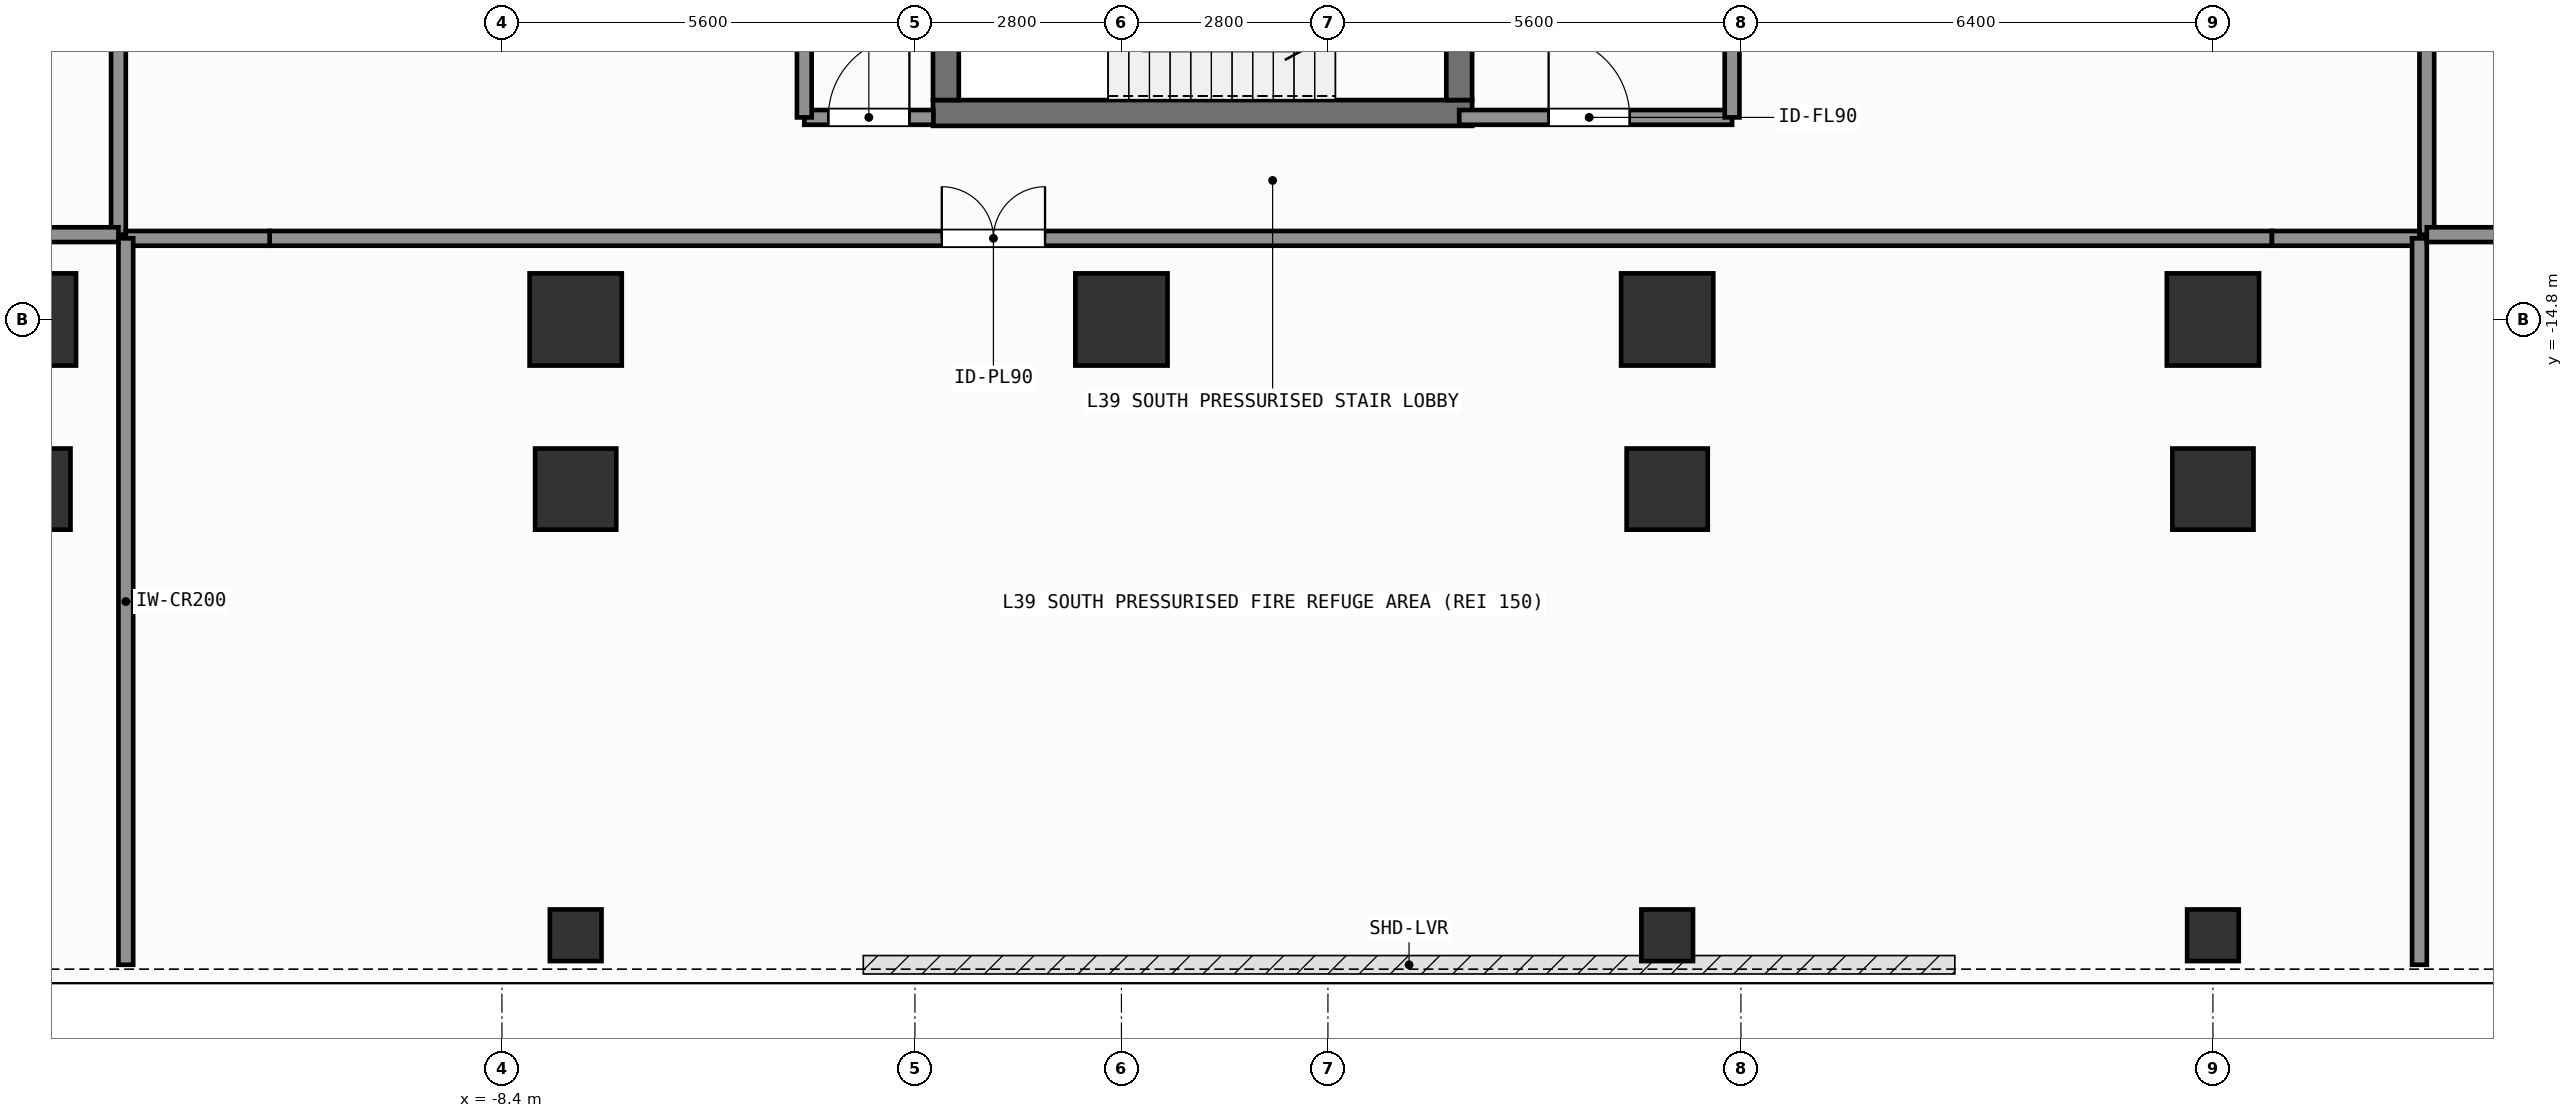
"""IFC4 building model, lengths in metres.
Left out: names, types, materials, properties, quantities, classifications, styles, units other than length and angle.
Written with IfcOpenShell. Run it as: python <this file> out.ifc"""

import sys

from ifc_helpers import new_model, si_unit, direction, frame, frame_2d, origin, origin_2d, place, context, subcontext, project, spatial, rectangle, hollow_rectangle, extrude, element, fill, save


model = new_model("IFC4")
c1 = context("Model", 3, precision=1e-05, world=origin(), true_north=direction((0.0, 1.0)))
c2 = subcontext(c1, "Body", "Model", "MODEL_VIEW")
j1 = project(units=[si_unit("LENGTHUNIT", "METRE"), si_unit("PLANEANGLEUNIT", "RADIAN")], contexts=[c1])
p1 = place(None, origin())
s1 = spatial("IfcSite", under=j1, at=p1, CompositionType="ELEMENT")
p2 = place(p1, origin())
s2 = spatial("IfcBuilding", under=s1, at=p2, CompositionType="ELEMENT")
p3 = place(p2, frame((0.0, 0.0, 156.3)))
s3 = spatial("IfcBuildingStorey", under=s2, at=p3, CompositionType="ELEMENT", Elevation=156.3)
p4 = place(p3, frame((-2.555, -12.0, 0.0), z_axis=(0.0, 0.0, 1.0), x_axis=(1.0, 0.0, 0.0)))
e1 = element("IfcWall", 1, at=p4, inside=s3, PredefinedType="SHEAR", context=c2, shape_type="SweptSolid", body=[
    extrude(rectangle(XDim=7.31, YDim=0.35, at=frame_2d((3.655, 0.0))), origin(), (0.0, 0.0, 1.0), 7.8),
])
p5 = place(p3, frame((-2.38, -11.825, 0.0), z_axis=(0.0, 0.0, 1.0), x_axis=(0.0, 1.0, 0.0)))
e2 = element("IfcWall", 2, at=p5, inside=s3, PredefinedType="SHEAR", context=c2, shape_type="SweptSolid", body=[
    extrude(rectangle(XDim=2.925, YDim=0.35, at=frame_2d((1.462, 0.0))), origin(), (0.0, 0.0, 1.0), 7.8),
])
p6 = place(p3, frame((4.58, -8.9, 0.0), z_axis=(0.0, 0.0, 1.0), x_axis=(0.0, -1.0, 0.0)))
e3 = element("IfcWall", 3, at=p6, inside=s3, PredefinedType="SHEAR", context=c2, shape_type="SweptSolid", body=[
    extrude(rectangle(XDim=2.925, YDim=0.35, at=frame_2d((1.462, 0.0))), origin(), (0.0, 0.0, 1.0), 7.8),
])
p7 = place(p6, frame((0.913, 0.0, 0.0)))
e4 = element("IfcOpeningElement", 4, at=p7, cuts=e3, PredefinedType="OPENING", context=c2, shape_type="SweptSolid", body=[
    extrude(rectangle(XDim=1.1, YDim=2.15, at=frame_2d((0.55, 1.075))), frame((0.0, 0.185, 0.0), z_axis=(0.0, -1.0, 0.0), x_axis=(1.0, 0.0, 0.0)), (0.0, 0.0, 1.0), 0.37),
])
for number, where, z_axis, x_axis in (
    (5, (-14.8, -14.8, 0.0), (0.0, 0.0, 1.0), (1.0, 0.0, 0.0)),
    (6, (-7.4, -14.8, 0.0), (0.0, 0.0, 1.0), (1.0, 0.0, 0.0)),
    (7, (0.0, -14.8, 0.0), (0.0, 0.0, 1.0), (1.0, 0.0, 0.0)),
    (8, (7.4, -14.8, 0.0), (0.0, 0.0, 1.0), (1.0, 0.0, 0.0)),
    (9, (14.8, -14.8, 0.0), (0.0, 0.0, 1.0), (1.0, 0.0, 0.0)),
):
    element("IfcColumn", number, at=place(p3, frame(where, z_axis=z_axis, x_axis=x_axis)), inside=s3, PredefinedType="COLUMN", context=c2, shape_type="SweptSolid", body=[
        extrude(rectangle(XDim=1.25, YDim=1.25, at=origin_2d()), origin(), (0.0, 0.0, 1.0), 7.8),
    ])
for number, where, z_axis, x_axis in (
    (10, (-14.8, -17.1, 0.0), (0.0, 0.0, 1.0), (1.0, 0.0, 0.0)),
    (11, (-7.4, -17.1, 0.0), (0.0, 0.0, 1.0), (1.0, 0.0, 0.0)),
    (12, (7.4, -17.1, 0.0), (0.0, 0.0, 1.0), (1.0, 0.0, 0.0)),
    (13, (14.8, -17.1, 0.0), (0.0, 0.0, 1.0), (1.0, 0.0, 0.0)),
):
    element("IfcColumn", number, at=place(p3, frame(where, z_axis=z_axis, x_axis=x_axis)), inside=s3, PredefinedType="COLUMN", context=c2, shape_type="SweptSolid", body=[
        extrude(rectangle(XDim=1.1, YDim=1.1, at=origin_2d()), origin(), (0.0, 0.0, 1.0), 7.8),
    ])
for number, where, z_axis, x_axis in (
    (14, (-7.4, -23.15, 0.0), (0.0, 0.0, 1.0), (1.0, 0.0, 0.0)),
    (15, (7.4, -23.15, 0.0), (0.0, 0.0, 1.0), (1.0, 0.0, 0.0)),
    (16, (14.8, -23.15, 0.0), (0.0, 0.0, 1.0), (1.0, 0.0, 0.0)),
):
    element("IfcColumn", number, at=place(p3, frame(where, z_axis=z_axis, x_axis=x_axis)), inside=s3, PredefinedType="COLUMN", context=c2, shape_type="SweptSolid", body=[
        extrude(hollow_rectangle(XDim=0.7, YDim=0.7, WallThickness=0.032, at=origin_2d()), origin(), (0.0, 0.0, 1.0), 7.8),
    ])
p8 = place(p3, frame((4.58, -12.06, 0.0), z_axis=(0.0, 0.0, 1.0), x_axis=(1.0, 0.0, 0.0)))
e17 = element("IfcWall", 17, at=p8, inside=s3, PredefinedType="SOLIDWALL", context=c2, shape_type="SweptSolid", body=[
    extrude(rectangle(XDim=3.7, YDim=0.2, at=frame_2d((1.85, 0.0))), origin(), (0.0, 0.0, 1.0), 7.58),
])
p9 = place(p8, frame((1.212, 0.0, 0.0)))
e18 = element("IfcOpeningElement", 18, at=p9, cuts=e17, PredefinedType="OPENING", context=c2, shape_type="SweptSolid", body=[
    extrude(rectangle(XDim=1.1, YDim=2.15, at=frame_2d((0.55, 1.075))), frame((0.0, 0.11, 0.0), z_axis=(0.0, -1.0, 0.0), x_axis=(1.0, 0.0, 0.0)), (0.0, 0.0, 1.0), 0.22),
])
p10 = place(p3, frame((-4.3, -12.06, 0.0), z_axis=(0.0, 0.0, 1.0), x_axis=(1.0, 0.0, 0.0)))
e19 = element("IfcWall", 19, at=p10, inside=s3, PredefinedType="SOLIDWALL", context=c2, shape_type="SweptSolid", body=[
    extrude(rectangle(XDim=1.75, YDim=0.2, at=frame_2d((0.875, 0.0))), origin(), (0.0, 0.0, 1.0), 7.58),
])
p11 = place(p10, frame((0.325, 0.0, 0.0)))
e20 = element("IfcOpeningElement", 20, at=p11, cuts=e19, PredefinedType="OPENING", context=c2, shape_type="SweptSolid", body=[
    extrude(rectangle(XDim=1.1, YDim=2.15, at=frame_2d((0.55, 1.075))), frame((0.0, 0.11, 0.0), z_axis=(0.0, -1.0, 0.0), x_axis=(1.0, 0.0, 0.0)), (0.0, 0.0, 1.0), 0.22),
])
p12 = place(p3, frame((-11.55, -13.7, 0.0), z_axis=(0.0, 0.0, 1.0), x_axis=(1.0, 0.0, 0.0)))
e21 = element("IfcWall", 21, at=p12, inside=s3, PredefinedType="SOLIDWALL", context=c2, shape_type="SweptSolid", body=[
    extrude(rectangle(XDim=27.15, YDim=0.2, at=frame_2d((13.575, 0.0))), origin(), (0.0, 0.0, 1.0), 7.58),
])
p13 = place(p12, frame((9.114, 0.0, 0.0)))
e22 = element("IfcOpeningElement", 22, at=p13, cuts=e21, PredefinedType="OPENING", context=c2, shape_type="SweptSolid", body=[
    extrude(rectangle(XDim=1.4, YDim=2.2, at=frame_2d((0.7, 1.1))), frame((0.0, 0.11, 0.0), z_axis=(0.0, -1.0, 0.0), x_axis=(1.0, 0.0, 0.0)), (0.0, 0.0, 1.0), 0.22),
])
p14 = place(p3, frame((-13.6, -13.65, 0.0), z_axis=(0.0, 0.0, 1.0), x_axis=(0.0, 1.0, 0.0)))
e23 = element("IfcWall", 23, at=p14, inside=s3, PredefinedType="SOLIDWALL", context=c2, shape_type="SweptSolid", body=[
    extrude(rectangle(XDim=13.73, YDim=0.2, at=frame_2d((6.865, 0.0))), origin(), (0.0, 0.0, 1.0), 7.58),
])
p15 = place(p14, frame((6.939, 0.0, 0.0)))
e24 = element("IfcOpeningElement", 24, at=p15, cuts=e23, PredefinedType="OPENING", context=c2, shape_type="SweptSolid", body=[
    extrude(rectangle(XDim=1.1, YDim=2.15, at=frame_2d((0.55, 1.075))), frame((0.0, 0.11, 0.0), z_axis=(0.0, -1.0, 0.0), x_axis=(1.0, 0.0, 0.0)), (0.0, 0.0, 1.0), 0.22),
])
p16 = place(p3, frame((17.7, -13.65, 0.0), z_axis=(0.0, 0.0, 1.0), x_axis=(0.0, 1.0, 0.0)))
e25 = element("IfcWall", 25, at=p16, inside=s3, PredefinedType="SOLIDWALL", context=c2, shape_type="SweptSolid", body=[
    extrude(rectangle(XDim=16.23, YDim=0.2, at=frame_2d((8.115, 0.0))), origin(), (0.0, 0.0, 1.0), 7.58),
])
p17 = place(p16, frame((7.654, 0.0, 0.0)))
e26 = element("IfcOpeningElement", 26, at=p17, cuts=e25, PredefinedType="OPENING", context=c2, shape_type="SweptSolid", body=[
    extrude(rectangle(XDim=1.1, YDim=2.15, at=frame_2d((0.55, 1.075))), frame((0.0, 0.11, 0.0), z_axis=(0.0, -1.0, 0.0), x_axis=(1.0, 0.0, 0.0)), (0.0, 0.0, 1.0), 0.22),
])
for number, where, z_axis, x_axis in (
    (27, (8.28, -12.06, 0.0), (0.0, 0.0, 1.0), (0.0, 1.0, 0.0)),
    (28, (-4.3, -12.06, 0.0), (0.0, 0.0, 1.0), (0.0, 1.0, 0.0)),
):
    element("IfcWall", number, at=place(p3, frame(where, z_axis=z_axis, x_axis=x_axis)), inside=s3, PredefinedType="SOLIDWALL", context=c2, shape_type="SweptSolid", body=[
        extrude(rectangle(XDim=3.185, YDim=0.2, at=frame_2d((1.593, 0.0))), origin(), (0.0, 0.0, 1.0), 7.58),
    ])
p18 = place(p3, frame((-13.5, -13.7, 0.0), z_axis=(0.0, 0.0, 1.0), x_axis=(1.0, 0.0, 0.0)))
e29 = element("IfcWall", 29, at=p18, inside=s3, PredefinedType="SOLIDWALL", context=c2, shape_type="SweptSolid", body=[
    extrude(rectangle(XDim=1.95, YDim=0.2, at=frame_2d((0.975, 0.0))), origin(), (0.0, 0.0, 1.0), 7.58),
])
p19 = place(p3, frame((15.6, -13.7, 0.0), z_axis=(0.0, 0.0, 1.0), x_axis=(1.0, 0.0, 0.0)))
e30 = element("IfcWall", 30, at=p19, inside=s3, PredefinedType="SOLIDWALL", context=c2, shape_type="SweptSolid", body=[
    extrude(rectangle(XDim=2.0, YDim=0.2, at=frame_2d((1.0, 0.0))), origin(), (0.0, 0.0, 1.0), 7.58),
])
for number, where, z_axis, x_axis in (
    (31, (-13.5, -23.55, 0.0), (0.0, 0.0, 1.0), (0.0, 1.0, 0.0)),
    (32, (17.6, -23.55, 0.0), (0.0, 0.0, 1.0), (0.0, 1.0, 0.0)),
):
    element("IfcWall", number, at=place(p3, frame(where, z_axis=z_axis, x_axis=x_axis)), inside=s3, PredefinedType="SOLIDWALL", context=c2, shape_type="SweptSolid", body=[
        extrude(rectangle(XDim=9.85, YDim=0.2, at=frame_2d((4.925, 0.0))), origin(), (0.0, 0.0, 1.0), 7.58),
    ])
p20 = place(p3, frame((-19.65, -13.65, 0.0), z_axis=(0.0, 0.0, 1.0), x_axis=(1.0, 0.0, 0.0)))
e33 = element("IfcWall", 33, at=p20, inside=s3, PredefinedType="SOLIDWALL", context=c2, shape_type="SweptSolid", body=[
    extrude(rectangle(XDim=6.05, YDim=0.2, at=frame_2d((3.025, 0.0))), origin(), (0.0, 0.0, 1.0), 7.58),
])
p21 = place(p3, frame((17.7, -13.65, 0.0), z_axis=(0.0, 0.0, 1.0), x_axis=(1.0, 0.0, 0.0)))
e34 = element("IfcWall", 34, at=p21, inside=s3, PredefinedType="SOLIDWALL", context=c2, shape_type="SweptSolid", body=[
    extrude(rectangle(XDim=9.75, YDim=0.2, at=frame_2d((4.875, 0.0))), origin(), (0.0, 0.0, 1.0), 7.58),
])
p22 = place(p9, origin())
e35 = element("IfcDoor", 35, at=p22, inside=s3, OperationType="SINGLE_SWING_LEFT", PredefinedType="DOOR", context=c2, shape_type="SweptSolid", body=[
    extrude(rectangle(XDim=1.1, YDim=2.15, at=frame_2d((0.55, 1.075))), frame((0.0, 0.025, 0.0), z_axis=(0.0, -1.0, 0.0), x_axis=(1.0, 0.0, 0.0)), (0.0, 0.0, 1.0), 0.05),
])
fill(e18, e35)
p23 = place(p11, origin())
e36 = element("IfcDoor", 36, at=p23, inside=s3, OperationType="SINGLE_SWING_RIGHT", PredefinedType="DOOR", context=c2, shape_type="SweptSolid", body=[
    extrude(rectangle(XDim=1.1, YDim=2.15, at=frame_2d((0.55, 1.075))), frame((0.0, 0.025, 0.0), z_axis=(0.0, -1.0, 0.0), x_axis=(1.0, 0.0, 0.0)), (0.0, 0.0, 1.0), 0.05),
])
fill(e20, e36)
p24 = place(p13, origin())
e37 = element("IfcDoor", 37, at=p24, inside=s3, OperationType="SINGLE_SWING_LEFT", PredefinedType="DOOR", context=c2, shape_type="SweptSolid", body=[
    extrude(rectangle(XDim=1.4, YDim=2.2, at=frame_2d((0.7, 1.1))), frame((0.0, 0.025, 0.0), z_axis=(0.0, -1.0, 0.0), x_axis=(1.0, 0.0, 0.0)), (0.0, 0.0, 1.0), 0.05),
])
fill(e22, e37)
save(model, sys.argv[1])
